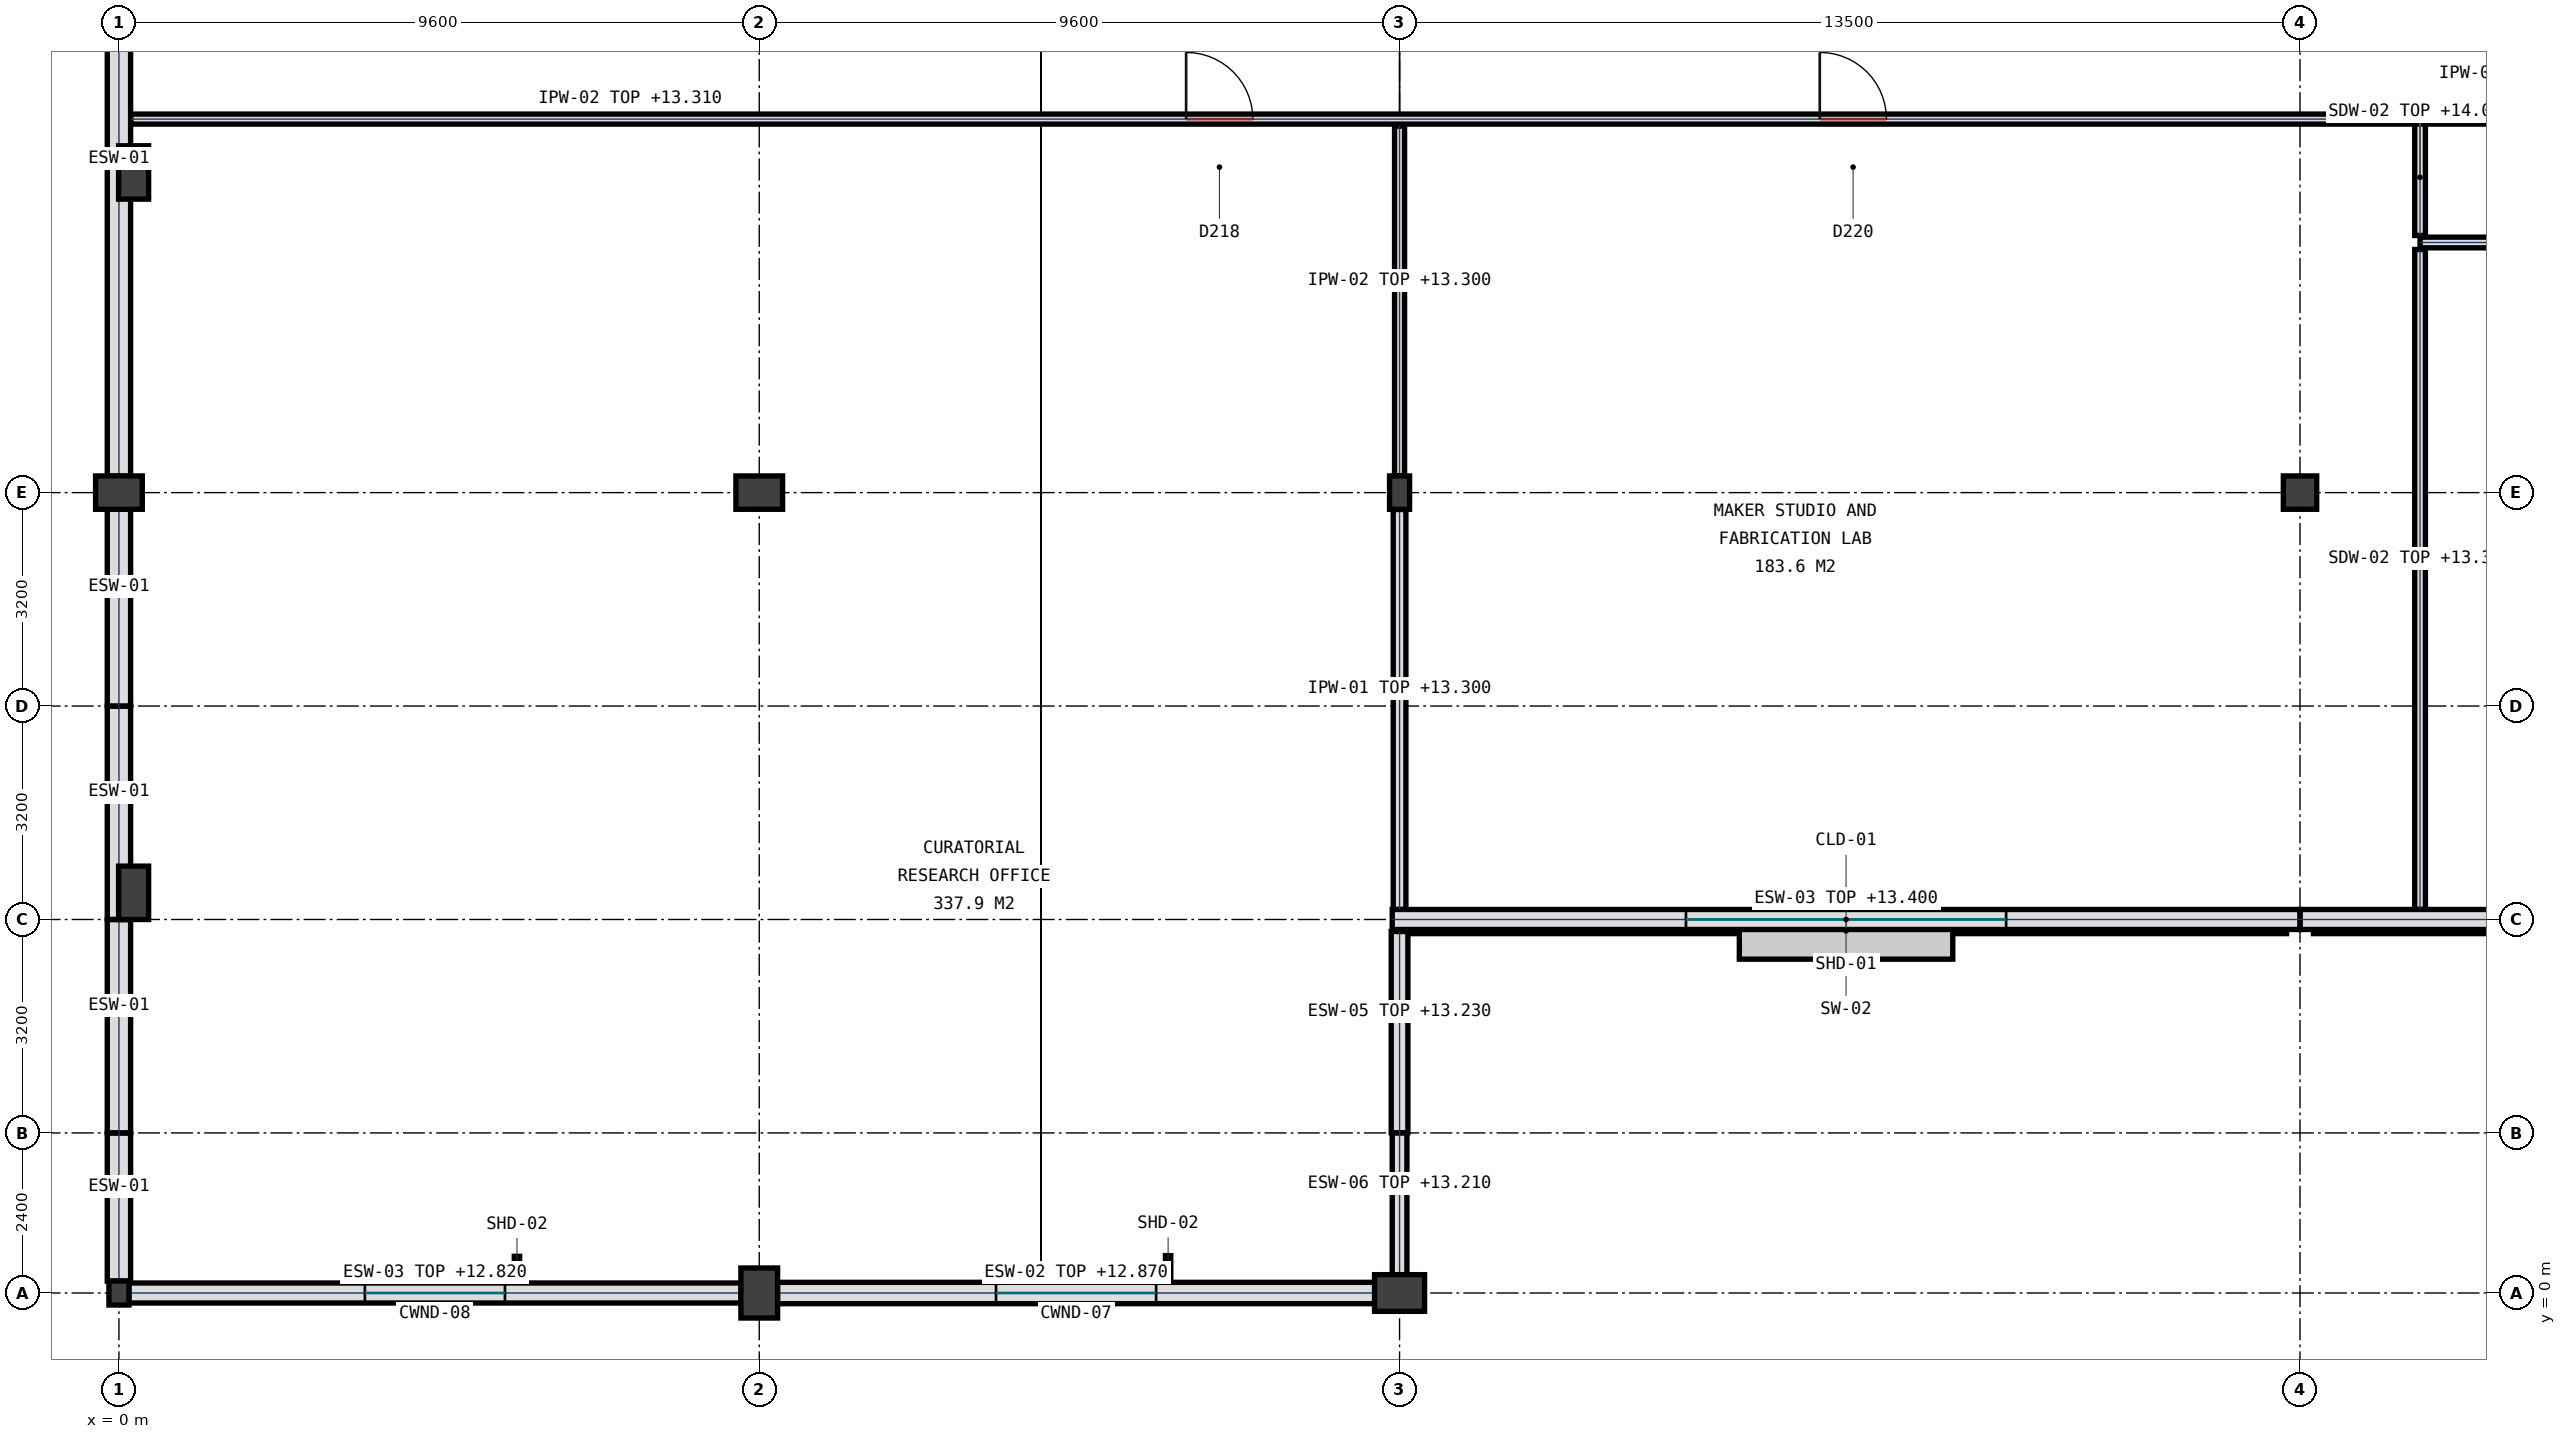
"""IFC4 building model, lengths in metres.
Left out: names, types, materials, properties, quantities, classifications, styles, units other than length and angle.
Written with IfcOpenShell. Run it as: python <this file> out.ifc"""

import sys

from ifc_helpers import new_model, si_unit, direction, frame, frame_2d, origin, origin_with_axes, origin_2d, place, context, subcontext, project, spatial, polyline, rectangle, i_section, outline, extrude, element, fill, save


model = new_model("IFC4")
c1 = context("Model", 3, precision=1e-05, world=origin(), true_north=direction((0.0, 1.0)))
c2 = subcontext(c1, "Body", "Model", "MODEL_VIEW")
j1 = project(units=[si_unit("LENGTHUNIT", "METRE"), si_unit("PLANEANGLEUNIT", "RADIAN")], contexts=[c1])
p1 = place(None, origin())
s1 = spatial("IfcSite", under=j1, at=p1, CompositionType="ELEMENT")
p2 = place(p1, origin())
s2 = spatial("IfcBuilding", under=s1, at=p2, CompositionType="ELEMENT")
p3 = place(p2, frame((0.0, 0.0, 9.9)))
s3 = spatial("IfcBuildingStorey", under=s2, at=p3, CompositionType="ELEMENT", Elevation=9.9)
p4 = place(p3, origin_with_axes())
e1 = element("IfcColumn", 1, at=p4, inside=s3, PredefinedType="COLUMN", context=c2, shape_type="SweptSolid", body=[
    extrude(i_section(OverallWidth=0.3, OverallDepth=0.36, WebThickness=0.012, FlangeThickness=0.022, FilletRadius=0.027, at=origin_2d()), origin(), (0.0, 0.0, 1.0), 4.5),
])
p5 = place(p3, frame((0.0, 12.0, 0.0), z_axis=(0.0, 0.0, 1.0), x_axis=(1.0, 0.0, 0.0)))
e2 = element("IfcColumn", 2, at=p5, inside=s3, PredefinedType="COLUMN", context=c2, shape_type="SweptSolid", body=[
    extrude(rectangle(XDim=0.7, YDim=0.5, at=origin_2d()), origin(), (0.0, 0.0, 1.0), 4.5),
])
p6 = place(p3, frame((9.6, 0.0, 0.0), z_axis=(0.0, 0.0, 1.0), x_axis=(0.0, 1.0, 0.0)))
e3 = element("IfcColumn", 3, at=p6, inside=s3, PredefinedType="COLUMN", context=c2, shape_type="SweptSolid", body=[
    extrude(rectangle(XDim=0.75, YDim=0.55, at=origin_2d()), origin(), (0.0, 0.0, 1.0), 4.5),
])
p7 = place(p3, frame((9.6, 12.0, 0.0), z_axis=(0.0, 0.0, 1.0), x_axis=(1.0, 0.0, 0.0)))
e4 = element("IfcColumn", 4, at=p7, inside=s3, PredefinedType="COLUMN", context=c2, shape_type="SweptSolid", body=[
    extrude(rectangle(XDim=0.7, YDim=0.5, at=origin_2d()), origin(), (0.0, 0.0, 1.0), 4.5),
])
p8 = place(p3, frame((19.2, 0.0, 0.0), z_axis=(0.0, 0.0, 1.0), x_axis=(1.0, 0.0, 0.0)))
e5 = element("IfcColumn", 5, at=p8, inside=s3, PredefinedType="COLUMN", context=c2, shape_type="SweptSolid", body=[
    extrude(rectangle(XDim=0.75, YDim=0.55, at=origin_2d()), origin(), (0.0, 0.0, 1.0), 4.5),
])
p9 = place(p3, frame((19.2, 12.0, 0.0), z_axis=(0.0, 0.0, 1.0), x_axis=(1.0, 0.0, 0.0)))
e6 = element("IfcColumn", 6, at=p9, inside=s3, PredefinedType="COLUMN", context=c2, shape_type="SweptSolid", body=[
    extrude(i_section(OverallWidth=0.3, OverallDepth=0.5, WebThickness=0.014, FlangeThickness=0.028, FilletRadius=0.027, at=origin_2d()), origin(), (0.0, 0.0, 1.0), 4.5),
])
p10 = place(p3, frame((32.7, 12.0, 0.0), z_axis=(0.0, 0.0, 1.0), x_axis=(1.0, 0.0, 0.0)))
e7 = element("IfcColumn", 7, at=p10, inside=s3, PredefinedType="COLUMN", context=c2, shape_type="SweptSolid", body=[
    extrude(rectangle(XDim=0.5, YDim=0.5, at=origin_2d()), origin(), (0.0, 0.0, 1.0), 4.5),
])
for number, where, z_axis, x_axis in (
    (8, (0.22, 6.0, 0.0), (0.0, 0.0, 1.0), (1.0, 0.0, 0.0)),
    (9, (0.22, 16.8, 0.0), (0.0, 0.0, 1.0), (1.0, 0.0, 0.0)),
):
    element("IfcColumn", number, at=place(p3, frame(where, z_axis=z_axis, x_axis=x_axis)), inside=s3, PredefinedType="PILASTER", context=c2, shape_type="SweptSolid", body=[
        extrude(rectangle(XDim=0.45, YDim=0.8, at=origin_2d()), origin(), (0.0, 0.0, 1.0), 4.5),
    ])
p11 = place(p3, frame((46.198, 5.6, 0.0), z_axis=(0.0, 0.0, 1.0), x_axis=(-1.0, 0.0, 0.0)))
e10 = element("IfcWall", 10, at=p11, inside=s3, PredefinedType="SOLIDWALL", context=c2, shape_type="SweptSolid", body=[
    extrude(rectangle(XDim=13.496, YDim=0.3, at=frame_2d((6.748, 0.0))), origin(), (0.0, 0.0, 1.0), 3.5),
])
p12 = place(p11, frame((4.148, 0.0, 1.1)))
e11 = element("IfcOpeningElement", 11, at=p12, cuts=e10, PredefinedType="OPENING", context=c2, shape_type="SweptSolid", body=[
    extrude(outline(polyline([(0.45, 0.9), (0.296, 0.873), (0.161, 0.795), (0.06, 0.675), (0.007, 0.528), (0.007, 0.372), (0.06, 0.225), (0.161, 0.105), (0.296, 0.027), (0.45, 0.0), (4.75, 0.0), (4.904, 0.027), (5.039, 0.105), (5.14, 0.225), (5.193, 0.372), (5.193, 0.528), (5.14, 0.675), (5.039, 0.795), (4.904, 0.873), (4.75, 0.9), (0.45, 0.9)])), frame((0.0, 0.16, 0.0), z_axis=(0.0, -1.0, 0.0), x_axis=(1.0, 0.0, 0.0)), (0.0, 0.0, 1.0), 0.32),
])
p13 = place(p3, frame((32.698, 5.6, 0.0), z_axis=(0.0, 0.0, 1.0), x_axis=(-1.0, 0.0, 0.0)))
e12 = element("IfcWall", 12, at=p13, inside=s3, PredefinedType="SOLIDWALL", context=c2, shape_type="SweptSolid", body=[
    extrude(rectangle(XDim=13.608, YDim=0.3, at=frame_2d((6.804, 0.0))), origin(), (0.0, 0.0, 1.0), 3.5),
])
p14 = place(p13, frame((4.404, 0.0, 1.1)))
e13 = element("IfcOpeningElement", 13, at=p14, cuts=e12, PredefinedType="OPENING", context=c2, shape_type="SweptSolid", body=[
    extrude(outline(polyline([(0.45, 0.9), (0.296, 0.873), (0.161, 0.795), (0.06, 0.675), (0.007, 0.528), (0.007, 0.372), (0.06, 0.225), (0.161, 0.105), (0.296, 0.027), (0.45, 0.0), (4.35, 0.0), (4.504, 0.027), (4.639, 0.105), (4.74, 0.225), (4.793, 0.372), (4.793, 0.528), (4.74, 0.675), (4.639, 0.795), (4.504, 0.873), (4.35, 0.9), (0.45, 0.9)])), frame((0.0, 0.16, 0.0), z_axis=(0.0, -1.0, 0.0), x_axis=(1.0, 0.0, 0.0)), (0.0, 0.0, 1.0), 0.32),
])
p15 = place(p3, frame((19.2, 5.42, 0.0), z_axis=(0.0, 0.0, 1.0), x_axis=(0.0, -1.0, 0.0)))
e14 = element("IfcWall", 14, at=p15, inside=s3, PredefinedType="SOLIDWALL", context=c2, shape_type="SweptSolid", body=[
    extrude(rectangle(XDim=3.018, YDim=0.25, at=frame_2d((1.509, 0.0))), origin(), (0.0, 0.0, 1.0), 3.33),
])
p16 = place(p3, frame((19.2, 2.398, 0.0), z_axis=(0.0, 0.0, 1.0), x_axis=(0.0, -1.0, 0.0)))
e15 = element("IfcWall", 15, at=p16, inside=s3, PredefinedType="SOLIDWALL", context=c2, shape_type="SweptSolid", body=[
    extrude(rectangle(XDim=2.125, YDim=0.22, at=frame_2d((1.062, 0.0))), origin(), (0.0, 0.0, 1.0), 3.31),
])
p17 = place(p3, frame((18.827, 0.0, 0.0), z_axis=(0.0, 0.0, 1.0), x_axis=(-1.0, 0.0, 0.0)))
e16 = element("IfcWall", 16, at=p17, inside=s3, PredefinedType="SOLIDWALL", context=c2, shape_type="SweptSolid", body=[
    extrude(rectangle(XDim=8.954, YDim=0.32, at=frame_2d((4.477, 0.0))), origin(), (0.0, 0.0, 1.0), 2.97),
])
p18 = place(p17, frame((3.277, 0.0, 0.95)))
e17 = element("IfcOpeningElement", 17, at=p18, cuts=e16, PredefinedType="OPENING", context=c2, shape_type="SweptSolid", body=[
    extrude(rectangle(XDim=2.4, YDim=1.35, at=frame_2d((1.2, 0.675))), frame((0.0, 0.17, 0.0), z_axis=(0.0, -1.0, 0.0), x_axis=(1.0, 0.0, 0.0)), (0.0, 0.0, 1.0), 0.34),
])
p19 = place(p3, frame((9.327, 0.0, 0.0), z_axis=(0.0, 0.0, 1.0), x_axis=(-1.0, 0.0, 0.0)))
e18 = element("IfcWall", 18, at=p19, inside=s3, PredefinedType="SOLIDWALL", context=c2, shape_type="SweptSolid", body=[
    extrude(rectangle(XDim=9.179, YDim=0.3, at=frame_2d((4.589, 0.0))), origin(), (0.0, 0.0, 1.0), 2.92),
])
p20 = place(p19, frame((3.54, 0.0, 0.95)))
e19 = element("IfcOpeningElement", 19, at=p20, cuts=e18, PredefinedType="OPENING", context=c2, shape_type="SweptSolid", body=[
    extrude(rectangle(XDim=2.1, YDim=1.35, at=frame_2d((1.05, 0.675))), frame((0.0, 0.16, 0.0), z_axis=(0.0, -1.0, 0.0), x_axis=(1.0, 0.0, 0.0)), (0.0, 0.0, 1.0), 0.32),
])
p21 = place(p3, frame((0.0, 0.178, 0.0), z_axis=(0.0, 0.0, 1.0), x_axis=(0.0, 1.0, 0.0)))
e20 = element("IfcWall", 20, at=p21, inside=s3, PredefinedType="SOLIDWALL", context=c2, shape_type="SweptSolid", body=[
    extrude(rectangle(XDim=2.22, YDim=0.35, at=frame_2d((1.11, 0.0))), origin(), (0.0, 0.0, 1.0), 4.22),
])
p22 = place(p3, frame((0.0, 2.402, 0.0), z_axis=(0.0, 0.0, 1.0), x_axis=(0.0, 1.0, 0.0)))
e21 = element("IfcWall", 21, at=p22, inside=s3, PredefinedType="SOLIDWALL", context=c2, shape_type="SweptSolid", body=[
    extrude(rectangle(XDim=3.196, YDim=0.35, at=frame_2d((1.598, 0.0))), origin(), (0.0, 0.0, 1.0), 4.22),
])
p23 = place(p3, frame((0.0, 5.602, 0.0), z_axis=(0.0, 0.0, 1.0), x_axis=(0.0, 1.0, 0.0)))
e22 = element("IfcWall", 22, at=p23, inside=s3, PredefinedType="SOLIDWALL", context=c2, shape_type="SweptSolid", body=[
    extrude(rectangle(XDim=3.196, YDim=0.35, at=frame_2d((1.598, 0.0))), origin(), (0.0, 0.0, 1.0), 4.22),
])
p24 = place(p3, frame((0.0, 8.802, 0.0), z_axis=(0.0, 0.0, 1.0), x_axis=(0.0, 1.0, 0.0)))
e23 = element("IfcWall", 23, at=p24, inside=s3, PredefinedType="SOLIDWALL", context=c2, shape_type="SweptSolid", body=[
    extrude(rectangle(XDim=2.95, YDim=0.35, at=frame_2d((1.475, 0.0))), origin(), (0.0, 0.0, 1.0), 4.22),
])
p25 = place(p3, frame((0.0, 12.248, 0.0), z_axis=(0.0, 0.0, 1.0), x_axis=(0.0, 1.0, 0.0)))
e24 = element("IfcWall", 24, at=p25, inside=s3, PredefinedType="SOLIDWALL", context=c2, shape_type="SweptSolid", body=[
    extrude(rectangle(XDim=8.904, YDim=0.35, at=frame_2d((4.452, 0.0))), origin(), (0.0, 0.0, 1.0), 4.22),
])
p26 = place(p3, frame((34.5, 15.75, 0.0), z_axis=(0.0, 0.0, 1.0), x_axis=(1.0, 0.0, 0.0)))
e25 = element("IfcWall", 25, at=p26, inside=s3, PredefinedType="PLUMBINGWALL", context=c2, shape_type="SweptSolid", body=[
    extrude(rectangle(XDim=9.2, YDim=0.16, at=frame_2d((4.6, 0.0))), origin(), (0.0, 0.0, 1.0), 3.7),
])
p27 = place(p26, frame((1.25, 0.0, 0.0)))
e26 = element("IfcOpeningElement", 26, at=p27, cuts=e25, PredefinedType="OPENING", context=c2, shape_type="SweptSolid", body=[
    extrude(rectangle(XDim=0.9, YDim=2.1, at=frame_2d((0.45, 1.05))), frame((0.0, 0.09, 0.0), z_axis=(0.0, -1.0, 0.0), x_axis=(1.0, 0.0, 0.0)), (0.0, 0.0, 1.0), 0.18),
])
p28 = place(p26, frame((4.65, 0.0, 0.0)))
e27 = element("IfcOpeningElement", 27, at=p28, cuts=e25, PredefinedType="OPENING", context=c2, shape_type="SweptSolid", body=[
    extrude(rectangle(XDim=0.9, YDim=2.1, at=frame_2d((0.45, 1.05))), frame((0.0, 0.09, 0.0), z_axis=(0.0, -1.0, 0.0), x_axis=(1.0, 0.0, 0.0)), (0.0, 0.0, 1.0), 0.18),
])
p29 = place(p26, frame((7.475, 0.0, 0.0)))
e28 = element("IfcOpeningElement", 28, at=p29, cuts=e25, PredefinedType="OPENING", context=c2, shape_type="SweptSolid", body=[
    extrude(rectangle(XDim=1.05, YDim=2.15, at=frame_2d((0.525, 1.075))), frame((0.0, 0.09, 0.0), z_axis=(0.0, -1.0, 0.0), x_axis=(1.0, 0.0, 0.0)), (0.0, 0.0, 1.0), 0.18),
])
p30 = place(p3, frame((34.5, 5.753, 0.0), z_axis=(0.0, 0.0, 1.0), x_axis=(0.0, 1.0, 0.0)))
e29 = element("IfcWall", 29, at=p30, inside=s3, PredefinedType="PLUMBINGWALL", context=c2, shape_type="SweptSolid", body=[
    extrude(rectangle(XDim=9.892, YDim=0.16, at=frame_2d((4.946, 0.0))), origin(), (0.0, 0.0, 1.0), 3.43),
])
p31 = place(p3, frame((34.5, 15.855, 0.0), z_axis=(0.0, 0.0, 1.0), x_axis=(0.0, 1.0, 0.0)))
e30 = element("IfcWall", 30, at=p31, inside=s3, PredefinedType="PLUMBINGWALL", context=c2, shape_type="SweptSolid", body=[
    extrude(rectangle(XDim=1.745, YDim=0.16, at=frame_2d((0.873, 0.0))), origin(), (0.0, 0.0, 1.0), 4.16),
])
p32 = place(p3, frame((0.178, 17.6, 0.0), z_axis=(0.0, 0.0, 1.0), x_axis=(1.0, 0.0, 0.0)))
e31 = element("IfcWall", 31, at=p32, inside=s3, PredefinedType="PARTITIONING", context=c2, shape_type="SweptSolid", body=[
    extrude(rectangle(XDim=34.272, YDim=0.15, at=frame_2d((17.136, 0.0))), origin(), (0.0, 0.0, 1.0), 3.41),
])
p33 = place(p32, frame((15.822, 0.0, 0.0)))
e32 = element("IfcOpeningElement", 32, at=p33, cuts=e31, PredefinedType="OPENING", context=c2, shape_type="SweptSolid", body=[
    extrude(rectangle(XDim=1.0, YDim=2.2, at=frame_2d((0.5, 1.1))), frame((0.0, 0.085, 0.0), z_axis=(0.0, -1.0, 0.0), x_axis=(1.0, 0.0, 0.0)), (0.0, 0.0, 1.0), 0.17),
])
p34 = place(p32, frame((25.322, 0.0, 0.0)))
e33 = element("IfcOpeningElement", 33, at=p34, cuts=e31, PredefinedType="OPENING", context=c2, shape_type="SweptSolid", body=[
    extrude(rectangle(XDim=1.0, YDim=2.2, at=frame_2d((0.5, 1.1))), frame((0.0, 0.085, 0.0), z_axis=(0.0, -1.0, 0.0), x_axis=(1.0, 0.0, 0.0)), (0.0, 0.0, 1.0), 0.17),
])
p35 = place(p3, frame((34.55, 17.6, 0.0), z_axis=(0.0, 0.0, 1.0), x_axis=(1.0, 0.0, 0.0)))
e34 = element("IfcWall", 34, at=p35, inside=s3, PredefinedType="PARTITIONING", context=c2, shape_type="SweptSolid", body=[
    extrude(rectangle(XDim=9.1, YDim=0.15, at=frame_2d((4.55, 0.0))), origin(), (0.0, 0.0, 1.0), 3.7),
])
p36 = place(p35, frame((4.075, 0.0, 0.0)))
e35 = element("IfcOpeningElement", 35, at=p36, cuts=e34, PredefinedType="OPENING", context=c2, shape_type="SweptSolid", body=[
    extrude(rectangle(XDim=0.95, YDim=2.15, at=frame_2d((0.475, 1.075))), frame((0.0, 0.085, 0.0), z_axis=(0.0, -1.0, 0.0), x_axis=(1.0, 0.0, 0.0)), (0.0, 0.0, 1.0), 0.17),
])
p37 = place(p3, frame((19.2, 5.753, 0.0), z_axis=(0.0, 0.0, 1.0), x_axis=(0.0, 1.0, 0.0)))
e36 = element("IfcWall", 36, at=p37, inside=s3, PredefinedType="PARTITIONING", context=c2, shape_type="SweptSolid", body=[
    extrude(rectangle(XDim=5.994, YDim=0.19, at=frame_2d((2.997, 0.0))), origin(), (0.0, 0.0, 1.0), 3.4),
])
p38 = place(p3, frame((19.2, 12.253, 0.0), z_axis=(0.0, 0.0, 1.0), x_axis=(0.0, 1.0, 0.0)))
e37 = element("IfcWall", 37, at=p38, inside=s3, PredefinedType="PARTITIONING", context=c2, shape_type="SweptSolid", body=[
    extrude(rectangle(XDim=5.242, YDim=0.15, at=frame_2d((2.621, 0.0))), origin(), (0.0, 0.0, 1.0), 3.4),
])
p39 = place(p14, origin())
e38 = element("IfcWindow", 38, at=p39, inside=s3, PartitioningType="SINGLE_PANEL", PredefinedType="WINDOW", context=c2, shape_type="SweptSolid", body=[
    extrude(outline(polyline([(0.45, 0.9), (0.296, 0.873), (0.161, 0.795), (0.06, 0.675), (0.007, 0.528), (0.007, 0.372), (0.06, 0.225), (0.161, 0.105), (0.296, 0.027), (0.45, 0.0), (4.35, 0.0), (4.504, 0.027), (4.639, 0.105), (4.74, 0.225), (4.793, 0.372), (4.793, 0.528), (4.74, 0.675), (4.639, 0.795), (4.504, 0.873), (4.35, 0.9), (0.45, 0.9)])), frame((0.0, 0.032, 0.0), z_axis=(0.0, -1.0, 0.0), x_axis=(1.0, 0.0, 0.0)), (0.0, 0.0, 1.0), 0.065),
])
fill(e13, e38)
p40 = place(p18, origin())
e39 = element("IfcWindow", 39, at=p40, inside=s3, PartitioningType="SINGLE_PANEL", PredefinedType="WINDOW", context=c2, shape_type="SweptSolid", body=[
    extrude(rectangle(XDim=2.4, YDim=1.35, at=frame_2d((1.2, 0.675))), frame((0.0, 0.032, 0.0), z_axis=(0.0, -1.0, 0.0), x_axis=(1.0, 0.0, 0.0)), (0.0, 0.0, 1.0), 0.065),
])
fill(e17, e39)
p41 = place(p20, origin())
e40 = element("IfcWindow", 40, at=p41, inside=s3, PartitioningType="SINGLE_PANEL", PredefinedType="WINDOW", context=c2, shape_type="SweptSolid", body=[
    extrude(rectangle(XDim=2.1, YDim=1.35, at=frame_2d((1.05, 0.675))), frame((0.0, 0.032, 0.0), z_axis=(0.0, -1.0, 0.0), x_axis=(1.0, 0.0, 0.0)), (0.0, 0.0, 1.0), 0.065),
])
fill(e19, e40)
p42 = place(p33, origin())
e41 = element("IfcDoor", 41, at=p42, inside=s3, OperationType="SINGLE_SWING_LEFT", PredefinedType="DOOR", context=c2, shape_type="SweptSolid", body=[
    extrude(rectangle(XDim=1.0, YDim=2.2, at=frame_2d((0.5, 1.1))), frame((0.0, 0.032, 0.0), z_axis=(0.0, -1.0, 0.0), x_axis=(1.0, 0.0, 0.0)), (0.0, 0.0, 1.0), 0.065),
])
fill(e32, e41)
p43 = place(p34, origin())
e42 = element("IfcDoor", 42, at=p43, inside=s3, OperationType="SINGLE_SWING_LEFT", PredefinedType="DOOR", context=c2, shape_type="SweptSolid", body=[
    extrude(rectangle(XDim=1.0, YDim=2.2, at=frame_2d((0.5, 1.1))), frame((0.0, 0.032, 0.0), z_axis=(0.0, -1.0, 0.0), x_axis=(1.0, 0.0, 0.0)), (0.0, 0.0, 1.0), 0.065),
])
fill(e33, e42)
save(model, sys.argv[1])
